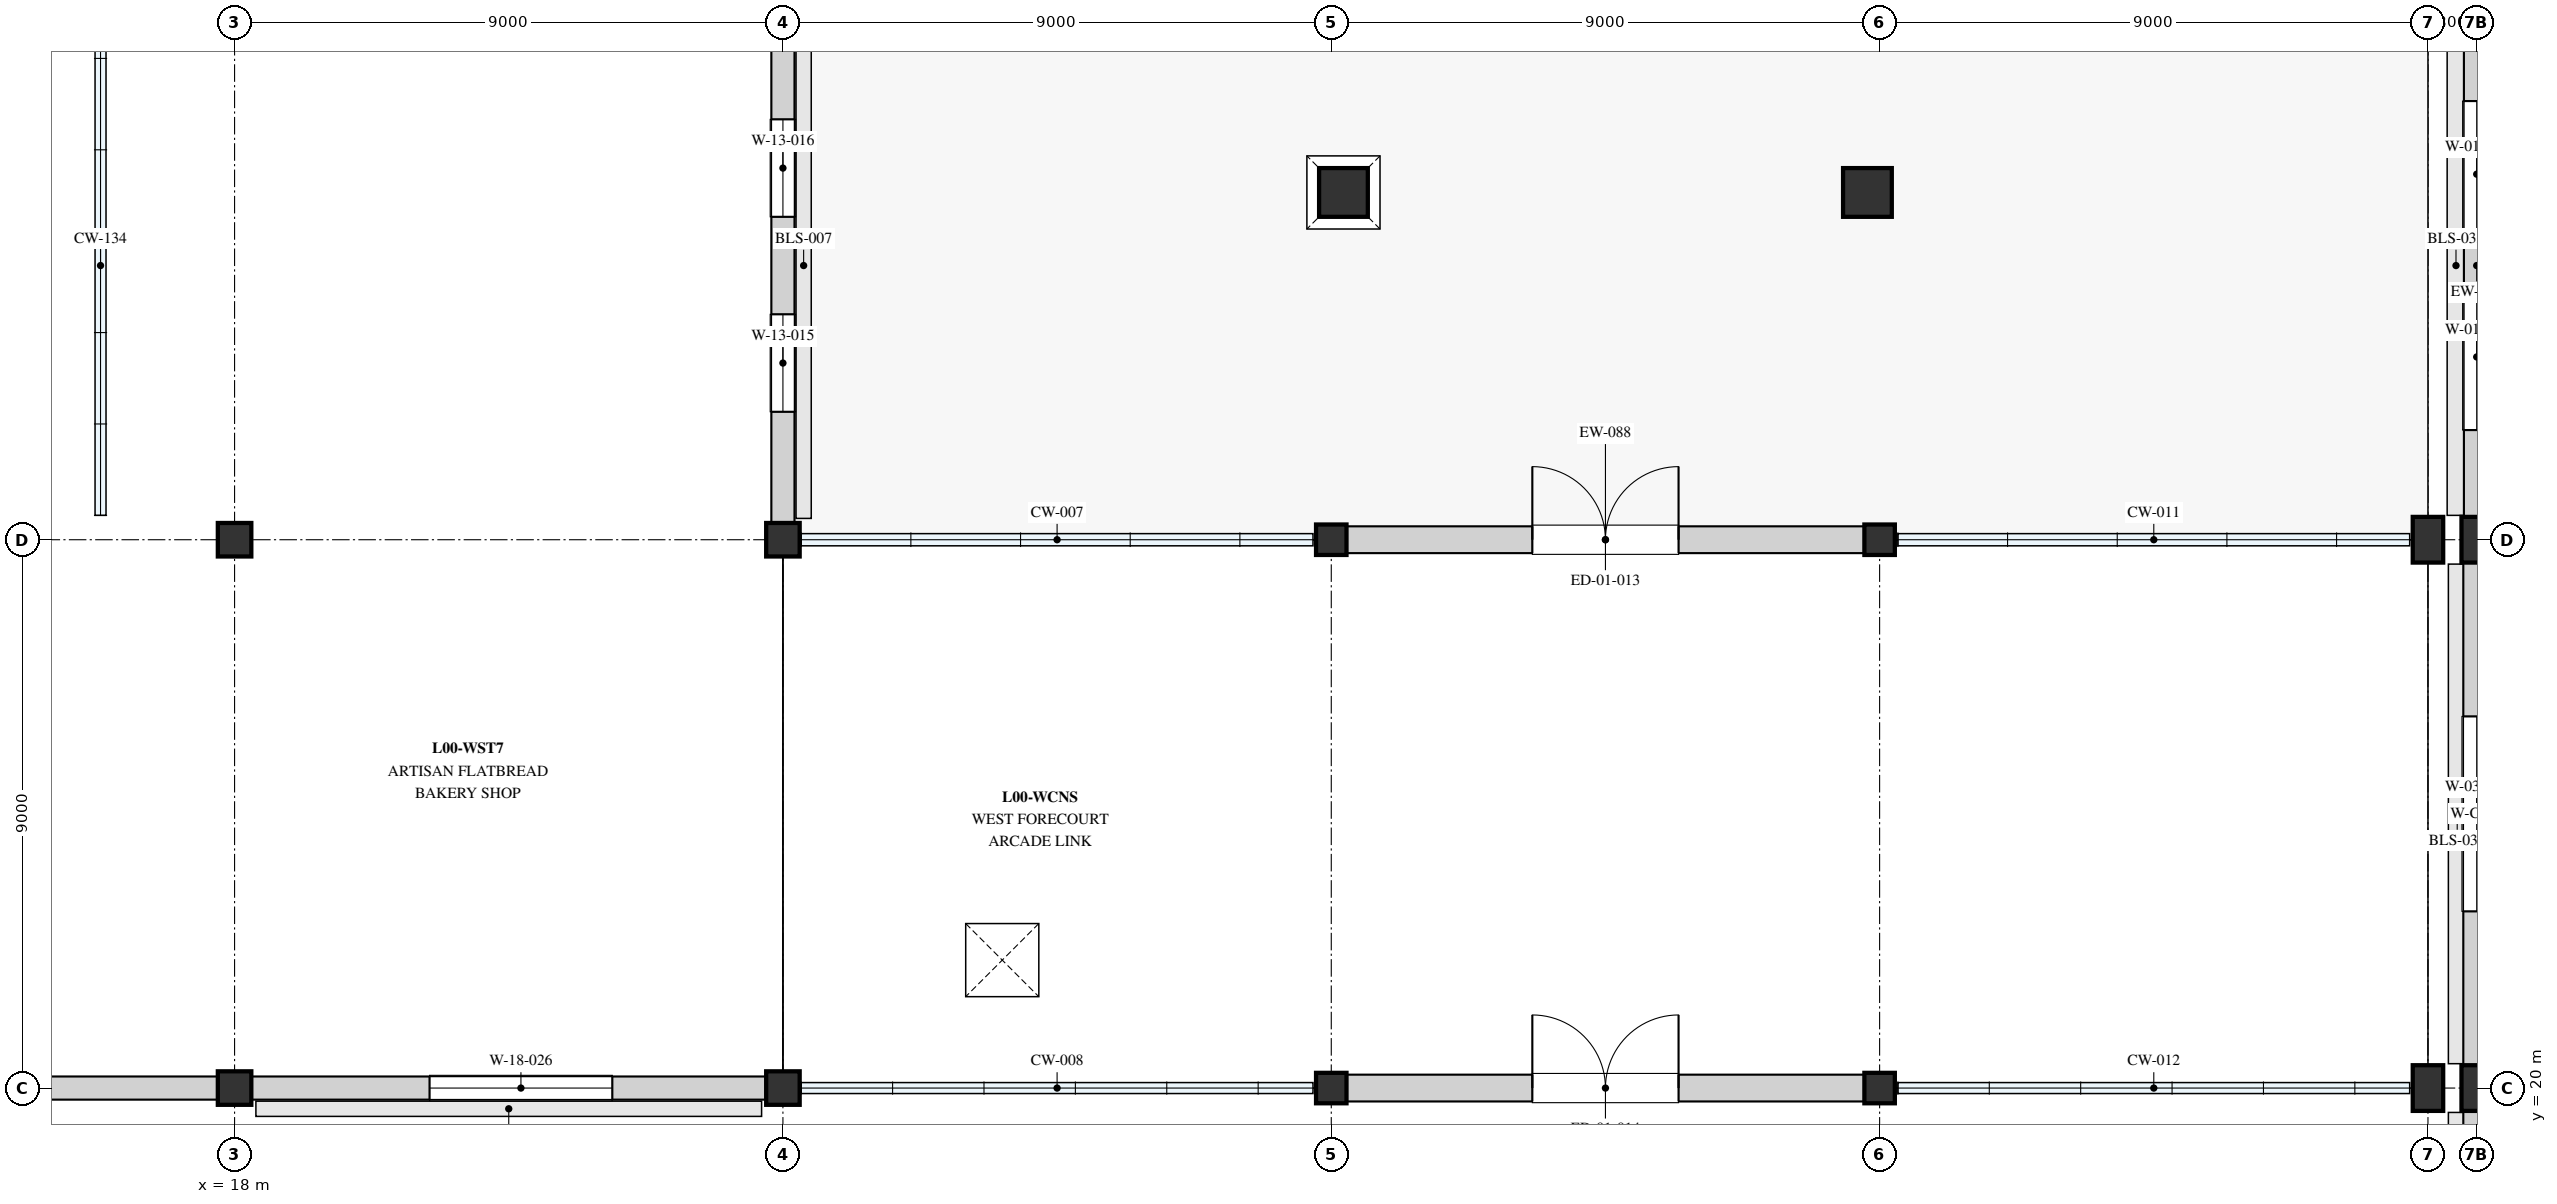
"""IFC4 building model, lengths in metres.
Left out: names, types, materials, properties, quantities, classifications, styles, units other than length and angle.
Written with IfcOpenShell. Run it as: python <this file> out.ifc"""

import sys

from ifc_helpers import new_model, si_unit, direction, frame, frame_2d, origin, origin_2d, place, context, subcontext, project, spatial, rectangle, extrude, element, fill, save


model = new_model("IFC4")
c1 = context("Model", 3, precision=1e-05, world=origin(), true_north=direction((0.0, 1.0)))
c2 = subcontext(c1, "Body", "Model", "MODEL_VIEW")
j1 = project(units=[si_unit("LENGTHUNIT", "METRE"), si_unit("PLANEANGLEUNIT", "RADIAN")], contexts=[c1])
p1 = place(None, origin())
s1 = spatial("IfcSite", under=j1, at=p1, CompositionType="ELEMENT")
p2 = place(p1, origin())
s2 = spatial("IfcBuilding", under=s1, at=p2, CompositionType="ELEMENT")
p3 = place(p2, origin())
s3 = spatial("IfcBuildingStorey", under=s2, at=p3, CompositionType="ELEMENT", Elevation=0.0)
for number, where, z_axis, x_axis in (
    (1, (18.0, 20.0, 0.0), (0.0, 0.0, 1.0), (1.0, 0.0, 0.0)),
    (2, (18.0, 29.0, 0.0), (0.0, 0.0, 1.0), (1.0, 0.0, 0.0)),
    (3, (27.0, 20.0, 0.0), (0.0, 0.0, 1.0), (1.0, 0.0, 0.0)),
    (4, (27.0, 29.0, 0.0), (0.0, 0.0, 1.0), (1.0, 0.0, 0.0)),
):
    element("IfcColumn", number, at=place(p3, frame(where, z_axis=z_axis, x_axis=x_axis)), inside=s3, PredefinedType="COLUMN", context=c2, shape_type="SweptSolid", body=[
        extrude(rectangle(XDim=0.55, YDim=0.55, at=origin_2d()), origin(), (0.0, 0.0, 1.0), 4.5),
    ])
for number, where, z_axis, x_axis in (
    (5, (36.0, 20.0, 0.0), (0.0, 0.0, 1.0), (1.0, 0.0, 0.0)),
    (6, (36.0, 29.0, 0.0), (0.0, 0.0, 1.0), (1.0, 0.0, 0.0)),
    (7, (45.0, 20.0, 0.0), (0.0, 0.0, 1.0), (1.0, 0.0, 0.0)),
    (8, (45.0, 29.0, 0.0), (0.0, 0.0, 1.0), (1.0, 0.0, 0.0)),
):
    element("IfcColumn", number, at=place(p3, frame(where, z_axis=z_axis, x_axis=x_axis)), inside=s3, PredefinedType="COLUMN", context=c2, shape_type="SweptSolid", body=[
        extrude(rectangle(XDim=0.5, YDim=0.5, at=origin_2d()), origin(), (0.0, 0.0, 1.0), 4.5),
    ])
for number, where, z_axis, x_axis in (
    (9, (54.0, 20.0, 0.0), (0.0, 0.0, 1.0), (1.0, 0.0, 0.0)),
    (10, (54.0, 29.0, 0.0), (0.0, 0.0, 1.0), (1.0, 0.0, 0.0)),
):
    element("IfcColumn", number, at=place(p3, frame(where, z_axis=z_axis, x_axis=x_axis)), inside=s3, PredefinedType="COLUMN", context=c2, shape_type="SweptSolid", body=[
        extrude(rectangle(XDim=0.5, YDim=0.75, at=origin_2d()), origin(), (0.0, 0.0, 1.0), 4.5),
    ])
p4 = place(p3, frame((54.8, 20.0, 0.0), z_axis=(0.0, 0.0, 1.0), x_axis=(1.0, 0.0, 0.0)))
e11 = element("IfcColumn", 11, at=p4, inside=s3, PredefinedType="COLUMN", context=c2, shape_type="SweptSolid", body=[
    extrude(rectangle(XDim=0.5, YDim=0.75, at=origin_2d()), origin(), (0.0, 0.0, 1.0), 4.06),
])
p5 = place(p3, frame((54.8, 29.0, 0.0), z_axis=(0.0, 0.0, 1.0), x_axis=(1.0, 0.0, 0.0)))
e12 = element("IfcColumn", 12, at=p5, inside=s3, PredefinedType="COLUMN", context=c2, shape_type="SweptSolid", body=[
    extrude(rectangle(XDim=0.5, YDim=0.75, at=origin_2d()), origin(), (0.0, 0.0, 1.0), 4.5),
])
for number, where, z_axis, x_axis in (
    (13, (36.2, 34.7, 0.0), (0.0, 0.0, 1.0), (1.0, 0.0, 0.0)),
    (14, (44.8, 34.7, 0.0), (0.0, 0.0, 1.0), (1.0, 0.0, 0.0)),
):
    element("IfcColumn", number, at=place(p3, frame(where, z_axis=z_axis, x_axis=x_axis)), inside=s3, PredefinedType="COLUMN", context=c2, shape_type="SweptSolid", body=[
        extrude(rectangle(XDim=0.8, YDim=0.8, at=origin_2d()), origin(), (0.0, 0.0, 1.0), 4.5),
    ])
p6 = place(p3, frame((27.0, 29.0, 0.0), z_axis=(0.0, 0.0, 1.0), x_axis=(0.0, 1.0, 0.0)))
e15 = element("IfcWall", 15, at=p6, inside=s3, PredefinedType="STANDARD", context=c2, shape_type="SweptSolid", body=[
    extrude(rectangle(XDim=9.0, YDim=0.38, at=frame_2d((4.5, 0.0))), origin(), (0.0, 0.0, 1.0), 3.35),
])
p7 = place(p6, frame((2.1, 0.0, 0.95)))
e16 = element("IfcOpeningElement", 16, at=p7, cuts=e15, PredefinedType="OPENING", context=c2, shape_type="SweptSolid", body=[
    extrude(rectangle(XDim=1.6, YDim=2.1, at=frame_2d((0.8, 1.05))), frame((0.0, 0.2, 0.0), z_axis=(0.0, -1.0, 0.0), x_axis=(1.0, 0.0, 0.0)), (0.0, 0.0, 1.0), 0.4),
])
p8 = place(p6, frame((5.3, 0.0, 0.95)))
e17 = element("IfcOpeningElement", 17, at=p8, cuts=e15, PredefinedType="OPENING", context=c2, shape_type="SweptSolid", body=[
    extrude(rectangle(XDim=1.6, YDim=2.1, at=frame_2d((0.8, 1.05))), frame((0.0, 0.2, 0.0), z_axis=(0.0, -1.0, 0.0), x_axis=(1.0, 0.0, 0.0)), (0.0, 0.0, 1.0), 0.4),
])
p9 = place(p3, frame((9.0, 20.0, 0.0), z_axis=(0.0, 0.0, 1.0), x_axis=(1.0, 0.0, 0.0)))
e18 = element("IfcWall", 18, at=p9, inside=s3, PredefinedType="STANDARD", context=c2, shape_type="SweptSolid", body=[
    extrude(rectangle(XDim=9.0, YDim=0.38, at=frame_2d((4.5, 0.0))), origin(), (0.0, 0.0, 1.0), 3.35),
])
p10 = place(p9, frame((3.45, 0.0, 0.0)))
e19 = element("IfcOpeningElement", 19, at=p10, cuts=e18, PredefinedType="OPENING", context=c2, shape_type="SweptSolid", body=[
    extrude(rectangle(XDim=2.1, YDim=2.5, at=frame_2d((1.05, 1.25))), frame((0.0, 0.2, 0.0), z_axis=(0.0, -1.0, 0.0), x_axis=(1.0, 0.0, 0.0)), (0.0, 0.0, 1.0), 0.4),
])
p11 = place(p3, frame((18.0, 20.0, 0.0), z_axis=(0.0, 0.0, 1.0), x_axis=(1.0, 0.0, 0.0)))
e20 = element("IfcWall", 20, at=p11, inside=s3, PredefinedType="STANDARD", context=c2, shape_type="SweptSolid", body=[
    extrude(rectangle(XDim=9.0, YDim=0.38, at=frame_2d((4.5, 0.0))), origin(), (0.0, 0.0, 1.0), 3.35),
])
p12 = place(p11, frame((3.2, 0.0, 0.86)))
e21 = element("IfcOpeningElement", 21, at=p12, cuts=e20, PredefinedType="OPENING", context=c2, shape_type="SweptSolid", body=[
    extrude(rectangle(XDim=3.0, YDim=2.3, at=frame_2d((1.5, 1.15))), frame((0.0, 0.2, 0.0), z_axis=(0.0, -1.0, 0.0), x_axis=(1.0, 0.0, 0.0)), (0.0, 0.0, 1.0), 0.4),
])
p13 = place(p3, frame((36.0, 29.0, 0.0), z_axis=(0.0, 0.0, 1.0), x_axis=(1.0, 0.0, 0.0)))
e22 = element("IfcWall", 22, at=p13, inside=s3, PredefinedType="STANDARD", context=c2, shape_type="SweptSolid", body=[
    extrude(rectangle(XDim=9.0, YDim=0.44, at=frame_2d((4.5, 0.0))), origin(), (0.0, 0.0, 1.0), 3.6),
])
p14 = place(p13, frame((3.3, 0.0, 0.0)))
e23 = element("IfcOpeningElement", 23, at=p14, cuts=e22, PredefinedType="OPENING", context=c2, shape_type="SweptSolid", body=[
    extrude(rectangle(XDim=2.4, YDim=2.6, at=frame_2d((1.2, 1.3))), frame((0.0, 0.23, 0.0), z_axis=(0.0, -1.0, 0.0), x_axis=(1.0, 0.0, 0.0)), (0.0, 0.0, 1.0), 0.46),
])
p15 = place(p3, frame((36.0, 20.0, 0.0), z_axis=(0.0, 0.0, 1.0), x_axis=(1.0, 0.0, 0.0)))
e24 = element("IfcWall", 24, at=p15, inside=s3, PredefinedType="STANDARD", context=c2, shape_type="SweptSolid", body=[
    extrude(rectangle(XDim=9.0, YDim=0.44, at=frame_2d((4.5, 0.0))), origin(), (0.0, 0.0, 1.0), 3.6),
])
p16 = place(p15, frame((3.3, 0.0, 0.0)))
e25 = element("IfcOpeningElement", 25, at=p16, cuts=e24, PredefinedType="OPENING", context=c2, shape_type="SweptSolid", body=[
    extrude(rectangle(XDim=2.4, YDim=2.6, at=frame_2d((1.2, 1.3))), frame((0.0, 0.23, 0.0), z_axis=(0.0, -1.0, 0.0), x_axis=(1.0, 0.0, 0.0)), (0.0, 0.0, 1.0), 0.46),
])
p17 = place(p3, frame((54.8, 10.0, 0.0), z_axis=(0.0, 0.0, 1.0), x_axis=(0.0, 1.0, 0.0)))
e26 = element("IfcWall", 26, at=p17, inside=s3, PredefinedType="STANDARD", context=c2, shape_type="SweptSolid", body=[
    extrude(rectangle(XDim=10.0, YDim=0.44, at=frame_2d((5.0, 0.0))), origin(), (0.0, 0.0, 1.0), 3.19),
])
p18 = place(p17, frame((3.4, 0.0, 1.5)))
e27 = element("IfcOpeningElement", 27, at=p18, cuts=e26, PredefinedType="OPENING", context=c2, shape_type="SweptSolid", body=[
    extrude(rectangle(XDim=3.2, YDim=1.5, at=frame_2d((1.6, 0.75))), frame((0.0, 0.23, 0.0), z_axis=(0.0, -1.0, 0.0), x_axis=(1.0, 0.0, 0.0)), (0.0, 0.0, 1.0), 0.46),
])
p19 = place(p3, frame((54.8, 20.0, 0.0), z_axis=(0.0, 0.0, 1.0), x_axis=(0.0, 1.0, 0.0)))
e28 = element("IfcWall", 28, at=p19, inside=s3, PredefinedType="STANDARD", context=c2, shape_type="SweptSolid", body=[
    extrude(rectangle(XDim=9.0, YDim=0.44, at=frame_2d((4.5, 0.0))), origin(), (0.0, 0.0, 1.0), 3.19),
])
p20 = place(p19, frame((2.9, 0.0, 1.5)))
e29 = element("IfcOpeningElement", 29, at=p20, cuts=e28, PredefinedType="OPENING", context=c2, shape_type="SweptSolid", body=[
    extrude(rectangle(XDim=3.2, YDim=1.5, at=frame_2d((1.6, 0.75))), frame((0.0, 0.23, 0.0), z_axis=(0.0, -1.0, 0.0), x_axis=(1.0, 0.0, 0.0)), (0.0, 0.0, 1.0), 0.46),
])
p21 = place(p3, frame((54.8, 29.0, 0.0), z_axis=(0.0, 0.0, 1.0), x_axis=(0.0, 1.0, 0.0)))
e30 = element("IfcWall", 30, at=p21, inside=s3, PredefinedType="STANDARD", context=c2, shape_type="SweptSolid", body=[
    extrude(rectangle(XDim=9.0, YDim=0.42, at=frame_2d((4.5, 0.0))), origin(), (0.0, 0.0, 1.0), 3.19),
])
p22 = place(p21, frame((1.8, 0.0, 0.41)))
e31 = element("IfcOpeningElement", 31, at=p22, cuts=e30, PredefinedType="OPENING", context=c2, shape_type="SweptSolid", body=[
    extrude(rectangle(XDim=2.4, YDim=2.6, at=frame_2d((1.2, 1.3))), frame((0.0, 0.22, 0.0), z_axis=(0.0, -1.0, 0.0), x_axis=(1.0, 0.0, 0.0)), (0.0, 0.0, 1.0), 0.44),
])
p23 = place(p21, frame((4.8, 0.0, 0.41)))
e32 = element("IfcOpeningElement", 32, at=p23, cuts=e30, PredefinedType="OPENING", context=c2, shape_type="SweptSolid", body=[
    extrude(rectangle(XDim=2.4, YDim=2.6, at=frame_2d((1.2, 1.3))), frame((0.0, 0.22, 0.0), z_axis=(0.0, -1.0, 0.0), x_axis=(1.0, 0.0, 0.0)), (0.0, 0.0, 1.0), 0.44),
])
p24 = place(p7, origin())
e33 = element("IfcWindow", 33, at=p24, inside=s3, PartitioningType="SINGLE_PANEL", PredefinedType="WINDOW", context=c2, shape_type="SweptSolid", body=[
    extrude(rectangle(XDim=1.6, YDim=2.1, at=frame_2d((0.8, 1.05))), frame((0.0, 0.03, 0.0), z_axis=(0.0, -1.0, 0.0), x_axis=(1.0, 0.0, 0.0)), (0.0, 0.0, 1.0), 0.06),
])
fill(e16, e33)
p25 = place(p8, origin())
e34 = element("IfcWindow", 34, at=p25, inside=s3, PartitioningType="SINGLE_PANEL", PredefinedType="WINDOW", context=c2, shape_type="SweptSolid", body=[
    extrude(rectangle(XDim=1.6, YDim=2.1, at=frame_2d((0.8, 1.05))), frame((0.0, 0.03, 0.0), z_axis=(0.0, -1.0, 0.0), x_axis=(1.0, 0.0, 0.0)), (0.0, 0.0, 1.0), 0.06),
])
fill(e17, e34)
p26 = place(p12, origin())
e35 = element("IfcWindow", 35, at=p26, inside=s3, PartitioningType="SINGLE_PANEL", PredefinedType="WINDOW", context=c2, shape_type="SweptSolid", body=[
    extrude(rectangle(XDim=3.0, YDim=2.3, at=frame_2d((1.5, 1.15))), frame((0.0, 0.03, 0.0), z_axis=(0.0, -1.0, 0.0), x_axis=(1.0, 0.0, 0.0)), (0.0, 0.0, 1.0), 0.06),
])
fill(e21, e35)
p27 = place(p14, origin())
e36 = element("IfcDoor", 36, at=p27, inside=s3, OperationType="DOUBLE_DOOR_SINGLE_SWING", PredefinedType="DOOR", context=c2, shape_type="SweptSolid", body=[
    extrude(rectangle(XDim=2.4, YDim=2.6, at=frame_2d((1.2, 1.3))), frame((0.0, 0.025, 0.0), z_axis=(0.0, -1.0, 0.0), x_axis=(1.0, 0.0, 0.0)), (0.0, 0.0, 1.0), 0.05),
])
fill(e23, e36)
p28 = place(p16, origin())
e37 = element("IfcDoor", 37, at=p28, inside=s3, OperationType="DOUBLE_DOOR_SINGLE_SWING", PredefinedType="DOOR", context=c2, shape_type="SweptSolid", body=[
    extrude(rectangle(XDim=2.4, YDim=2.6, at=frame_2d((1.2, 1.3))), frame((0.0, 0.025, 0.0), z_axis=(0.0, -1.0, 0.0), x_axis=(1.0, 0.0, 0.0)), (0.0, 0.0, 1.0), 0.05),
])
fill(e25, e37)
p29 = place(p20, origin())
e38 = element("IfcWindow", 38, at=p29, inside=s3, PartitioningType="SINGLE_PANEL", PredefinedType="WINDOW", context=c2, shape_type="SweptSolid", body=[
    extrude(rectangle(XDim=3.2, YDim=1.5, at=frame_2d((1.6, 0.75))), frame((0.0, 0.03, 0.0), z_axis=(0.0, -1.0, 0.0), x_axis=(1.0, 0.0, 0.0)), (0.0, 0.0, 1.0), 0.06),
])
fill(e29, e38)
p30 = place(p22, origin())
e39 = element("IfcWindow", 39, at=p30, inside=s3, PartitioningType="SINGLE_PANEL", PredefinedType="WINDOW", context=c2, shape_type="SweptSolid", body=[
    extrude(rectangle(XDim=2.4, YDim=2.6, at=frame_2d((1.2, 1.3))), frame((0.0, 0.03, 0.0), z_axis=(0.0, -1.0, 0.0), x_axis=(1.0, 0.0, 0.0)), (0.0, 0.0, 1.0), 0.06),
])
fill(e31, e39)
p31 = place(p23, origin())
e40 = element("IfcWindow", 40, at=p31, inside=s3, PartitioningType="SINGLE_PANEL", PredefinedType="WINDOW", context=c2, shape_type="SweptSolid", body=[
    extrude(rectangle(XDim=2.4, YDim=2.6, at=frame_2d((1.2, 1.3))), frame((0.0, 0.03, 0.0), z_axis=(0.0, -1.0, 0.0), x_axis=(1.0, 0.0, 0.0)), (0.0, 0.0, 1.0), 0.06),
])
fill(e32, e40)
save(model, sys.argv[1])
